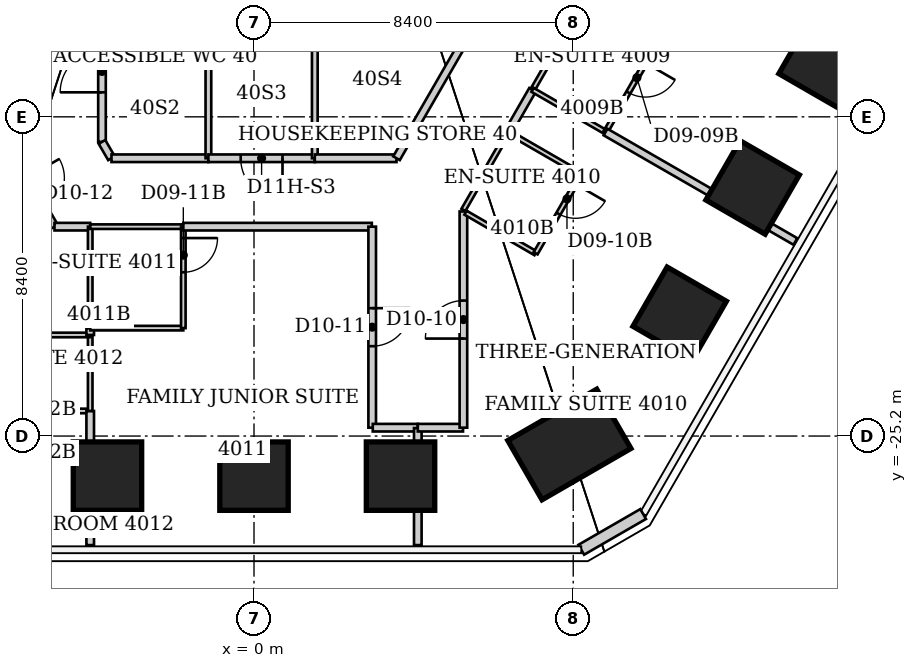
"""IFC4 building model, lengths in metres.
Left out: names, types, materials, properties, quantities, classifications, styles, units other than length and angle.
Written with IfcOpenShell. Run it as: python <this file> out.ifc"""

import sys

from ifc_helpers import new_model, si_unit, direction, frame, frame_2d, origin, origin_2d, place, context, subcontext, project, spatial, rectangle, extrude, element, fill, save


model = new_model("IFC4")
c1 = context("Model", 3, precision=1e-05, world=origin(), true_north=direction((0.0, 1.0)))
c2 = subcontext(c1, "Body", "Model", "MODEL_VIEW")
j1 = project(units=[si_unit("LENGTHUNIT", "METRE"), si_unit("PLANEANGLEUNIT", "RADIAN")], contexts=[c1])
p1 = place(None, origin())
s1 = spatial("IfcSite", under=j1, at=p1, CompositionType="ELEMENT")
p2 = place(p1, origin())
s2 = spatial("IfcBuilding", under=s1, at=p2, CompositionType="ELEMENT")
p3 = place(p2, frame((0.0, 0.0, 161.4)))
s3 = spatial("IfcBuildingStorey", under=s2, at=p3, CompositionType="ELEMENT", Elevation=161.4)
p4 = place(p3, frame((15.04, -15.333, 0.0), z_axis=(-0.034330688643, 0.034972383758, 0.99879844623), x_axis=(0.86556895094, -0.498559709879, 0.047208122752)))
e1 = element("IfcColumn", 1, at=p4, inside=s3, PredefinedType="COLUMN", context=c2, shape_type="SweptSolid", body=[
    extrude(rectangle(XDim=1.8, YDim=1.8, at=origin_2d()), origin(), (0.0, 0.0, 1.0), 3.805),
])
p5 = place(p3, frame((13.12, -18.658, 0.0), z_axis=(-0.029962490236, 0.042601913311, 0.998642742006), x_axis=(0.865617982926, -0.498471929182, 0.047236039769)))
e2 = element("IfcColumn", 2, at=p5, inside=s3, PredefinedType="COLUMN", context=c2, shape_type="SweptSolid", body=[
    extrude(rectangle(XDim=1.8, YDim=1.8, at=origin_2d()), origin(), (0.0, 0.0, 1.0), 3.805),
])
p6 = place(p3, frame((11.2, -21.983, 0.0), z_axis=(-0.025529655274, 0.050161282473, 0.998414784767), x_axis=(0.865565037486, -0.498569049576, 0.04718123236)))
e3 = element("IfcColumn", 3, at=p6, inside=s3, PredefinedType="COLUMN", context=c2, shape_type="SweptSolid", body=[
    extrude(rectangle(XDim=1.8, YDim=1.8, at=origin_2d()), origin(), (0.0, 0.0, 1.0), 3.806),
])
p7 = place(p3, frame((8.299, -25.422, 0.0), z_axis=(-0.019109248601, 0.058481995719, 0.998105551931), x_axis=(0.500012624267, -0.863923719226, 0.060192881077)))
e4 = element("IfcColumn", 4, at=p7, inside=s3, PredefinedType="COLUMN", context=c2, shape_type="SweptSolid", body=[
    extrude(rectangle(XDim=1.8, YDim=2.7, at=origin_2d()), origin(), (0.0, 0.0, 1.0), 3.807),
])
p8 = place(p3, frame((3.856, -26.255, 0.0), z_axis=(-0.008657869889, 0.059001779984, 0.998220332015), x_axis=(-0.000629006962, -0.998257870617, 0.058998543208)))
e5 = element("IfcColumn", 5, at=p8, inside=s3, PredefinedType="COLUMN", context=c2, shape_type="SweptSolid", body=[
    extrude(rectangle(XDim=1.8, YDim=1.8, at=origin_2d()), origin(), (0.0, 0.0, 1.0), 3.807),
])
p9 = place(p3, frame((0.0, -26.255, 0.0), z_axis=(0.0, 0.059003991457, 0.998257746773), x_axis=(0.0, -0.998257746773, 0.059003991457)))
e6 = element("IfcColumn", 6, at=p9, inside=s3, PredefinedType="COLUMN", context=c2, shape_type="SweptSolid", body=[
    extrude(rectangle(XDim=1.8, YDim=1.8, at=origin_2d()), origin(), (0.0, 0.0, 1.0), 3.807),
])
p10 = place(p3, frame((-3.856, -26.255, 0.0), z_axis=(0.008657869889, 0.059001779984, 0.998220332015), x_axis=(0.000629006962, -0.998257870617, 0.058998543208)))
e7 = element("IfcColumn", 7, at=p10, inside=s3, PredefinedType="COLUMN", context=c2, shape_type="SweptSolid", body=[
    extrude(rectangle(XDim=1.8, YDim=1.8, at=origin_2d()), origin(), (0.0, 0.0, 1.0), 3.807),
])
p11 = place(p3, frame((10.24, -27.252, 0.0), z_axis=(0.0, 0.0, 1.0), x_axis=(-0.866045024864, -0.499966013754, 0.0)))
e8 = element("IfcWall", 8, at=p11, inside=s3, PredefinedType="SOLIDWALL", context=c2, shape_type="SweptSolid", body=[
    extrude(rectangle(XDim=1.88, YDim=0.3, at=frame_2d((0.94, 0.0))), origin(), (0.0, 0.0, 1.0), 3.64),
])
p12 = place(p3, frame((-6.71, -24.54, 0.0), z_axis=(0.0, 0.0, 1.0), x_axis=(1.0, 0.0, 0.0)))
e9 = element("IfcWall", 9, at=p12, inside=s3, PredefinedType="PARTITIONING", context=c2, shape_type="SweptSolid", body=[
    extrude(rectangle(XDim=2.4, YDim=0.12, at=frame_2d((1.2, 0.0))), origin(), (0.0, 0.0, 1.0), 3.64),
])
p13 = place(p12, frame((0.45, 0.0, 0.0)))
e10 = element("IfcOpeningElement", 10, at=p13, cuts=e9, PredefinedType="OPENING", context=c2, shape_type="SweptSolid", body=[
    extrude(rectangle(XDim=0.9, YDim=2.03, at=frame_2d((0.45, 1.015))), frame((0.0, 0.06, 0.0), z_axis=(0.0, -1.0, 0.0), x_axis=(1.0, 0.0, 0.0)), (0.0, 0.0, 1.0), 0.12),
])
p14 = place(p3, frame((-6.23, -17.99, 0.0), z_axis=(0.0, 0.0, 1.0), x_axis=(0.499431599995, -0.866353321068, 0.0)))
e11 = element("IfcWall", 11, at=p14, inside=s3, PredefinedType="PARTITIONING", context=c2, shape_type="SweptSolid", body=[
    extrude(rectangle(XDim=1.962, YDim=0.2, at=frame_2d((0.981, 0.0))), origin(), (0.0, 0.0, 1.0), 3.64),
])
p15 = place(p14, frame((0.481, 0.0, 0.0)))
e12 = element("IfcOpeningElement", 12, at=p15, cuts=e11, PredefinedType="OPENING", context=c2, shape_type="SweptSolid", body=[
    extrude(rectangle(XDim=1.0, YDim=2.13, at=frame_2d((0.5, 1.065))), frame((0.0, 0.1, 0.0), z_axis=(0.0, -1.0, 0.0), x_axis=(1.0, 0.0, 0.0)), (0.0, 0.0, 1.0), 0.2),
])
p16 = place(p3, frame((-5.25, -19.69, 0.0), z_axis=(0.0, 0.0, 1.0), x_axis=(1.0, 0.0, 0.0)))
e13 = element("IfcWall", 13, at=p16, inside=s3, PredefinedType="PARTITIONING", context=c2, shape_type="SweptSolid", body=[
    extrude(rectangle(XDim=0.94, YDim=0.2, at=frame_2d((0.47, 0.0))), origin(), (0.0, 0.0, 1.0), 3.64),
])
p17 = place(p3, frame((-4.31, -28.07, 0.0), z_axis=(0.0, 0.0, 1.0), x_axis=(0.0, 1.0, 0.0)))
e14 = element("IfcWall", 14, at=p17, inside=s3, PredefinedType="PARTITIONING", context=c2, shape_type="SweptSolid", body=[
    extrude(rectangle(XDim=3.53, YDim=0.2, at=frame_2d((1.765, 0.0))), origin(), (0.0, 0.0, 1.0), 3.64),
])
p18 = place(p3, frame((-4.31, -24.54, 0.0), z_axis=(0.0, 0.0, 1.0), x_axis=(0.0, 1.0, 0.0)))
e15 = element("IfcWall", 15, at=p18, inside=s3, PredefinedType="PARTITIONING", context=c2, shape_type="SweptSolid", body=[
    extrude(rectangle(XDim=2.0, YDim=0.12, at=frame_2d((1.0, 0.0))), origin(), (0.0, 0.0, 1.0), 3.64),
])
p19 = place(p3, frame((-4.31, -22.54, 0.0), z_axis=(0.0, 0.0, 1.0), x_axis=(-1.0, 0.0, 0.0)))
e16 = element("IfcWall", 16, at=p19, inside=s3, PredefinedType="PARTITIONING", context=c2, shape_type="SweptSolid", body=[
    extrude(rectangle(XDim=2.4, YDim=0.12, at=frame_2d((1.2, 0.0))), origin(), (0.0, 0.0, 1.0), 3.64),
])
p20 = place(p3, frame((-4.31, -22.54, 0.0), z_axis=(0.0, 0.0, 1.0), x_axis=(0.0, 1.0, 0.0)))
e17 = element("IfcWall", 17, at=p20, inside=s3, PredefinedType="PARTITIONING", context=c2, shape_type="SweptSolid", body=[
    extrude(rectangle(XDim=0.18, YDim=0.2, at=frame_2d((0.09, 0.0))), origin(), (0.0, 0.0, 1.0), 3.64),
])
p21 = place(p3, frame((-4.31, -22.36, 0.0), z_axis=(0.0, 0.0, 1.0), x_axis=(0.0, 1.0, 0.0)))
e18 = element("IfcWall", 18, at=p21, inside=s3, PredefinedType="PARTITIONING", context=c2, shape_type="SweptSolid", body=[
    extrude(rectangle(XDim=2.67, YDim=0.12, at=frame_2d((1.335, 0.0))), origin(), (0.0, 0.0, 1.0), 3.64),
])
for number, where, z_axis, x_axis in (
    (19, (-4.31, -22.36, 0.0), (0.0, 0.0, 1.0), (1.0, 0.0, 0.0)),
    (20, (-4.31, -19.69, 0.0), (0.0, 0.0, 1.0), (1.0, 0.0, 0.0)),
):
    element("IfcWall", number, at=place(p3, frame(where, z_axis=z_axis, x_axis=x_axis)), inside=s3, PredefinedType="PARTITIONING", context=c2, shape_type="SweptSolid", body=[
        extrude(rectangle(XDim=2.45, YDim=0.12, at=frame_2d((1.225, 0.0))), origin(), (0.0, 0.0, 1.0), 3.64),
    ])
p22 = place(p3, frame((-4.0, -17.46, 0.0), z_axis=(0.0, 0.0, 1.0), x_axis=(0.0, 1.0, 0.0)))
e21 = element("IfcWall", 21, at=p22, inside=s3, PredefinedType="PARTITIONING", context=c2, shape_type="SweptSolid", body=[
    extrude(rectangle(XDim=3.71, YDim=0.2, at=frame_2d((1.855, 0.0))), origin(), (0.0, 0.0, 1.0), 3.64),
])
p23 = place(p22, frame((1.305, 0.0, 0.0)))
e22 = element("IfcOpeningElement", 22, at=p23, cuts=e21, PredefinedType="OPENING", context=c2, shape_type="SweptSolid", body=[
    extrude(rectangle(XDim=1.1, YDim=2.2, at=frame_2d((0.55, 1.1))), frame((0.0, 0.1, 0.0), z_axis=(0.0, -1.0, 0.0), x_axis=(1.0, 0.0, 0.0)), (0.0, 0.0, 1.0), 0.2),
])
p24 = place(p3, frame((-3.75, -17.89, 0.0), z_axis=(0.0, 0.0, 1.0), x_axis=(-0.502680181512, 0.864472460588, 0.0)))
e23 = element("IfcWall", 23, at=p24, inside=s3, PredefinedType="PARTITIONING", context=c2, shape_type="SweptSolid", body=[
    extrude(rectangle(XDim=0.497, YDim=0.2, at=frame_2d((0.249, 0.0))), origin(), (0.0, 0.0, 1.0), 3.64),
])
p25 = place(p3, frame((-1.86, -22.36, 0.0), z_axis=(0.0, 0.0, 1.0), x_axis=(0.0, 1.0, 0.0)))
e24 = element("IfcWall", 24, at=p25, inside=s3, PredefinedType="PARTITIONING", context=c2, shape_type="SweptSolid", body=[
    extrude(rectangle(XDim=2.67, YDim=0.12, at=frame_2d((1.335, 0.0))), origin(), (0.0, 0.0, 1.0), 2.86),
])
p26 = place(p25, frame((1.47, 0.0, 0.0)))
e25 = element("IfcOpeningElement", 25, at=p26, cuts=e24, PredefinedType="OPENING", context=c2, shape_type="SweptSolid", body=[
    extrude(rectangle(XDim=0.9, YDim=2.03, at=frame_2d((0.45, 1.015))), frame((0.0, 0.06, 0.0), z_axis=(0.0, -1.0, 0.0), x_axis=(1.0, 0.0, 0.0)), (0.0, 0.0, 1.0), 0.12),
])
p27 = place(p3, frame((-1.86, -19.69, 0.0), z_axis=(0.0, 0.0, 1.0), x_axis=(1.0, 0.0, 0.0)))
e26 = element("IfcWall", 26, at=p27, inside=s3, PredefinedType="PARTITIONING", context=c2, shape_type="SweptSolid", body=[
    extrude(rectangle(XDim=4.96, YDim=0.2, at=frame_2d((2.48, 0.0))), origin(), (0.0, 0.0, 1.0), 3.64),
])
p28 = place(p3, frame((-1.2, -17.89, 0.0), z_axis=(0.0, 0.0, 1.0), x_axis=(-1.0, 0.0, 0.0)))
e27 = element("IfcWall", 27, at=p28, inside=s3, PredefinedType="PARTITIONING", context=c2, shape_type="SweptSolid", body=[
    extrude(rectangle(XDim=2.55, YDim=0.2, at=frame_2d((1.275, 0.0))), origin(), (0.0, 0.0, 1.0), 3.64),
])
p29 = place(p3, frame((-1.2, -13.75, 0.0), z_axis=(0.0, 0.0, 1.0), x_axis=(0.0, -1.0, 0.0)))
e28 = element("IfcWall", 28, at=p29, inside=s3, PredefinedType="PARTITIONING", context=c2, shape_type="SweptSolid", body=[
    extrude(rectangle(XDim=4.14, YDim=0.15, at=frame_2d((2.07, 0.0))), origin(), (0.0, 0.0, 1.0), 3.64),
])
p30 = place(p3, frame((1.6, -17.89, 0.0), z_axis=(0.0, 0.0, 1.0), x_axis=(-1.0, 0.0, 0.0)))
e29 = element("IfcWall", 29, at=p30, inside=s3, PredefinedType="PARTITIONING", context=c2, shape_type="SweptSolid", body=[
    extrude(rectangle(XDim=2.8, YDim=0.2, at=frame_2d((1.4, 0.0))), origin(), (0.0, 0.0, 1.0), 3.64),
])
p31 = place(p30, frame((0.85, 0.0, 0.0)))
e30 = element("IfcOpeningElement", 30, at=p31, cuts=e29, PredefinedType="OPENING", context=c2, shape_type="SweptSolid", body=[
    extrude(rectangle(XDim=1.1, YDim=2.2, at=frame_2d((0.55, 1.1))), frame((0.0, 0.1, 0.0), z_axis=(0.0, -1.0, 0.0), x_axis=(1.0, 0.0, 0.0)), (0.0, 0.0, 1.0), 0.2),
])
p32 = place(p3, frame((1.6, -13.8, 0.0), z_axis=(0.0, 0.0, 1.0), x_axis=(0.0, -1.0, 0.0)))
e31 = element("IfcWall", 31, at=p32, inside=s3, PredefinedType="PARTITIONING", context=c2, shape_type="SweptSolid", body=[
    extrude(rectangle(XDim=4.09, YDim=0.15, at=frame_2d((2.045, 0.0))), origin(), (0.0, 0.0, 1.0), 3.64),
])
p33 = place(p3, frame((3.11, -19.69, 0.0), z_axis=(0.0, 0.0, 1.0), x_axis=(0.0, -1.0, 0.0)))
e32 = element("IfcWall", 32, at=p33, inside=s3, PredefinedType="PARTITIONING", context=c2, shape_type="SweptSolid", body=[
    extrude(rectangle(XDim=5.29, YDim=0.2, at=frame_2d((2.645, 0.0))), origin(), (0.0, 0.0, 1.0), 3.64),
])
p34 = place(p33, frame((2.145, 0.0, 0.0)))
e33 = element("IfcOpeningElement", 33, at=p34, cuts=e32, PredefinedType="OPENING", context=c2, shape_type="SweptSolid", body=[
    extrude(rectangle(XDim=1.0, YDim=2.13, at=frame_2d((0.5, 1.065))), frame((0.0, 0.1, 0.0), z_axis=(0.0, -1.0, 0.0), x_axis=(1.0, 0.0, 0.0)), (0.0, 0.0, 1.0), 0.2),
])
p35 = place(p3, frame((3.125, -24.98, 0.0), z_axis=(0.0, 0.0, 1.0), x_axis=(1.0, 0.0, 0.0)))
e34 = element("IfcWall", 34, at=p35, inside=s3, PredefinedType="PARTITIONING", context=c2, shape_type="SweptSolid", body=[
    extrude(rectangle(XDim=1.185, YDim=0.2, at=frame_2d((0.593, 0.0))), origin(), (0.0, 0.0, 1.0), 3.64),
])
p36 = place(p3, frame((3.75, -17.89, 0.0), z_axis=(0.0, 0.0, 1.0), x_axis=(-1.0, 0.0, 0.0)))
e35 = element("IfcWall", 35, at=p36, inside=s3, PredefinedType="PARTITIONING", context=c2, shape_type="SweptSolid", body=[
    extrude(rectangle(XDim=2.15, YDim=0.2, at=frame_2d((1.075, 0.0))), origin(), (0.0, 0.0, 1.0), 3.64),
])
p37 = place(p3, frame((4.31, -28.07, 0.0), z_axis=(0.0, 0.0, 1.0), x_axis=(0.0, 1.0, 0.0)))
e36 = element("IfcWall", 36, at=p37, inside=s3, PredefinedType="PARTITIONING", context=c2, shape_type="SweptSolid", body=[
    extrude(rectangle(XDim=3.08, YDim=0.2, at=frame_2d((1.54, 0.0))), origin(), (0.0, 0.0, 1.0), 3.64),
])
p38 = place(p3, frame((4.31, -24.98, 0.0), z_axis=(0.0, 0.0, 1.0), x_axis=(1.0, 0.0, 0.0)))
e37 = element("IfcWall", 37, at=p38, inside=s3, PredefinedType="PARTITIONING", context=c2, shape_type="SweptSolid", body=[
    extrude(rectangle(XDim=1.19, YDim=0.2, at=frame_2d((0.595, 0.0))), origin(), (0.0, 0.0, 1.0), 3.64),
])
p39 = place(p3, frame((5.51, -24.98, 0.0), z_axis=(0.0, 0.0, 1.0), x_axis=(0.0, 1.0, 0.0)))
e38 = element("IfcWall", 38, at=p39, inside=s3, PredefinedType="PARTITIONING", context=c2, shape_type="SweptSolid", body=[
    extrude(rectangle(XDim=5.69, YDim=0.2, at=frame_2d((2.845, 0.0))), origin(), (0.0, 0.0, 1.0), 3.64),
])
p40 = place(p39, frame((2.345, 0.0, 0.0)))
e39 = element("IfcOpeningElement", 39, at=p40, cuts=e38, PredefinedType="OPENING", context=c2, shape_type="SweptSolid", body=[
    extrude(rectangle(XDim=1.0, YDim=2.13, at=frame_2d((0.5, 1.065))), frame((0.0, 0.1, 0.0), z_axis=(0.0, -1.0, 0.0), x_axis=(1.0, 0.0, 0.0)), (0.0, 0.0, 1.0), 0.2),
])
p41 = place(p3, frame((5.51, -19.25, 0.0), z_axis=(0.0, 0.0, 1.0), x_axis=(0.498837591974, 0.866695481028, 0.0)))
e40 = element("IfcWall", 40, at=p41, inside=s3, PredefinedType="PARTITIONING", context=c2, shape_type="SweptSolid", body=[
    extrude(rectangle(XDim=2.365, YDim=0.12, at=frame_2d((1.183, 0.0))), origin(), (0.0, 0.0, 1.0), 3.64),
])
p42 = place(p3, frame((5.566, -19.323, 0.0), z_axis=(0.0, 0.0, 1.0), x_axis=(0.865436746432, -0.501018201192, 0.0)))
e41 = element("IfcWall", 41, at=p42, inside=s3, PredefinedType="PARTITIONING", context=c2, shape_type="SweptSolid", body=[
    extrude(rectangle(XDim=2.13, YDim=0.12, at=frame_2d((1.065, 0.0))), origin(), (0.0, 0.0, 1.0), 3.64),
])
p43 = place(p3, frame((6.083, -13.85, 0.0), z_axis=(0.0, 0.0, 1.0), x_axis=(-0.499977643516, -0.866038310922, 0.0)))
e42 = element("IfcWall", 42, at=p43, inside=s3, PredefinedType="PARTITIONING", context=c2, shape_type="SweptSolid", body=[
    extrude(rectangle(XDim=4.665, YDim=0.2, at=frame_2d((2.333, 0.0))), origin(), (0.0, 0.0, 1.0), 3.64),
])
p44 = place(p3, frame((6.69, -17.2, 0.0), z_axis=(0.0, 0.0, 1.0), x_axis=(0.499623473928, 0.866242682105, 0.0)))
e43 = element("IfcWall", 43, at=p44, inside=s3, PredefinedType="PARTITIONING", context=c2, shape_type="SweptSolid", body=[
    extrude(rectangle(XDim=1.281, YDim=0.2, at=frame_2d((0.641, 0.0))), origin(), (0.0, 0.0, 1.0), 3.64),
])
p45 = place(p3, frame((7.33, -16.09, 0.0), z_axis=(0.0, 0.0, 1.0), x_axis=(0.499693115345, 0.866202511239, 0.0)))
e44 = element("IfcWall", 44, at=p45, inside=s3, PredefinedType="PARTITIONING", context=c2, shape_type="SweptSolid", body=[
    extrude(rectangle(XDim=2.401, YDim=0.12, at=frame_2d((1.201, 0.0))), origin(), (0.0, 0.0, 1.0), 3.64),
])
p46 = place(p3, frame((7.33, -16.09, 0.0), z_axis=(0.0, 0.0, 1.0), x_axis=(0.86575271903, -0.500472006703, 0.0)))
e45 = element("IfcWall", 45, at=p46, inside=s3, PredefinedType="PARTITIONING", context=c2, shape_type="SweptSolid", body=[
    extrude(rectangle(XDim=2.218, YDim=0.12, at=frame_2d((1.109, 0.0))), origin(), (0.0, 0.0, 1.0), 3.64),
])
p47 = place(p3, frame((7.41, -20.39, 0.0), z_axis=(0.0, 0.0, 1.0), x_axis=(0.499737123639, 0.866177122335, 0.0)))
e46 = element("IfcWall", 46, at=p47, inside=s3, PredefinedType="PARTITIONING", context=c2, shape_type="SweptSolid", body=[
    extrude(rectangle(XDim=2.401, YDim=0.12, at=frame_2d((1.201, 0.0))), origin(), (0.0, 0.0, 1.0), 3.64),
])
p48 = place(p47, frame((1.201, 0.0, 0.0)))
e47 = element("IfcOpeningElement", 47, at=p48, cuts=e46, PredefinedType="OPENING", context=c2, shape_type="SweptSolid", body=[
    extrude(rectangle(XDim=0.9, YDim=2.03, at=frame_2d((0.45, 1.015))), frame((0.0, 0.06, 0.0), z_axis=(0.0, -1.0, 0.0), x_axis=(1.0, 0.0, 0.0)), (0.0, 0.0, 1.0), 0.12),
])
p49 = place(p3, frame((8.61, -18.31, 0.0), z_axis=(0.0, 0.0, 1.0), x_axis=(-0.865732595383, 0.500506816428, 0.0)))
e48 = element("IfcWall", 48, at=p49, inside=s3, PredefinedType="PARTITIONING", context=c2, shape_type="SweptSolid", body=[
    extrude(rectangle(XDim=2.218, YDim=0.12, at=frame_2d((1.109, 0.0))), origin(), (0.0, 0.0, 1.0), 3.64),
])
p50 = place(p3, frame((9.25, -17.2, 0.0), z_axis=(0.0, 0.0, 1.0), x_axis=(0.499737123639, 0.866177122335, 0.0)))
e49 = element("IfcWall", 49, at=p50, inside=s3, PredefinedType="PARTITIONING", context=c2, shape_type="SweptSolid", body=[
    extrude(rectangle(XDim=2.401, YDim=0.12, at=frame_2d((1.201, 0.0))), origin(), (0.0, 0.0, 1.0), 3.64),
])
p51 = place(p50, frame((1.201, 0.0, 0.0)))
e50 = element("IfcOpeningElement", 50, at=p51, cuts=e49, PredefinedType="OPENING", context=c2, shape_type="SweptSolid", body=[
    extrude(rectangle(XDim=0.9, YDim=2.03, at=frame_2d((0.45, 1.015))), frame((0.0, 0.06, 0.0), z_axis=(0.0, -1.0, 0.0), x_axis=(1.0, 0.0, 0.0)), (0.0, 0.0, 1.0), 0.12),
])
p52 = place(p3, frame((9.25, -17.2, 0.0), z_axis=(0.0, 0.0, 1.0), x_axis=(0.866353281607, -0.499431668448, 0.0)))
e51 = element("IfcWall", 51, at=p52, inside=s3, PredefinedType="PARTITIONING", context=c2, shape_type="SweptSolid", body=[
    extrude(rectangle(XDim=5.767, YDim=0.2, at=frame_2d((2.883, 0.0))), origin(), (0.0, 0.0, 1.0), 3.64),
])
p53 = place(p3, frame((10.45, -15.12, 0.0), z_axis=(0.0, 0.0, 1.0), x_axis=(-0.865705017107, 0.500554515868, 0.0)))
e52 = element("IfcWall", 52, at=p53, inside=s3, PredefinedType="PARTITIONING", context=c2, shape_type="SweptSolid", body=[
    extrude(rectangle(XDim=2.218, YDim=0.12, at=frame_2d((1.109, 0.0))), origin(), (0.0, 0.0, 1.0), 3.64),
])
p54 = place(p51, origin())
e53 = element("IfcDoor", 53, at=p54, inside=s3, OperationType="SINGLE_SWING_RIGHT", PredefinedType="DOOR", context=c2, shape_type="SweptSolid", body=[
    extrude(rectangle(XDim=0.9, YDim=2.03, at=frame_2d((0.45, 1.015))), frame((0.0, 0.025, 0.0), z_axis=(0.0, -1.0, 0.0), x_axis=(1.0, 0.0, 0.0)), (0.0, 0.0, 1.0), 0.05),
])
fill(e50, e53)
p55 = place(p40, origin())
e54 = element("IfcDoor", 54, at=p55, inside=s3, OperationType="SINGLE_SWING_LEFT", PredefinedType="DOOR", context=c2, shape_type="SweptSolid", body=[
    extrude(rectangle(XDim=1.0, YDim=2.13, at=frame_2d((0.5, 1.065))), frame((0.0, 0.025, 0.0), z_axis=(0.0, -1.0, 0.0), x_axis=(1.0, 0.0, 0.0)), (0.0, 0.0, 1.0), 0.05),
])
fill(e39, e54)
p56 = place(p48, origin())
e55 = element("IfcDoor", 55, at=p56, inside=s3, OperationType="SINGLE_SWING_RIGHT", PredefinedType="DOOR", context=c2, shape_type="SweptSolid", body=[
    extrude(rectangle(XDim=0.9, YDim=2.03, at=frame_2d((0.45, 1.015))), frame((0.0, 0.025, 0.0), z_axis=(0.0, -1.0, 0.0), x_axis=(1.0, 0.0, 0.0)), (0.0, 0.0, 1.0), 0.05),
])
fill(e47, e55)
p57 = place(p34, origin())
e56 = element("IfcDoor", 56, at=p57, inside=s3, OperationType="SINGLE_SWING_LEFT", PredefinedType="DOOR", context=c2, shape_type="SweptSolid", body=[
    extrude(rectangle(XDim=1.0, YDim=2.13, at=frame_2d((0.5, 1.065))), frame((0.0, 0.025, 0.0), z_axis=(0.0, -1.0, 0.0), x_axis=(1.0, 0.0, 0.0)), (0.0, 0.0, 1.0), 0.05),
])
fill(e33, e56)
p58 = place(p26, origin())
e57 = element("IfcDoor", 57, at=p58, inside=s3, OperationType="SINGLE_SWING_RIGHT", PredefinedType="DOOR", context=c2, shape_type="SweptSolid", body=[
    extrude(rectangle(XDim=0.9, YDim=2.03, at=frame_2d((0.45, 1.015))), frame((0.0, 0.025, 0.0), z_axis=(0.0, -1.0, 0.0), x_axis=(1.0, 0.0, 0.0)), (0.0, 0.0, 1.0), 0.05),
])
fill(e25, e57)
p59 = place(p23, origin())
e58 = element("IfcDoor", 58, at=p59, inside=s3, OperationType="SINGLE_SWING_LEFT", PredefinedType="DOOR", context=c2, shape_type="SweptSolid", body=[
    extrude(rectangle(XDim=1.1, YDim=2.2, at=frame_2d((0.55, 1.1))), frame((0.0, 0.025, 0.0), z_axis=(0.0, -1.0, 0.0), x_axis=(1.0, 0.0, 0.0)), (0.0, 0.0, 1.0), 0.05),
])
fill(e22, e58)
p60 = place(p31, origin())
e59 = element("IfcDoor", 59, at=p60, inside=s3, OperationType="SINGLE_SWING_LEFT", PredefinedType="DOOR", context=c2, shape_type="SweptSolid", body=[
    extrude(rectangle(XDim=1.1, YDim=2.2, at=frame_2d((0.55, 1.1))), frame((0.0, 0.025, 0.0), z_axis=(0.0, -1.0, 0.0), x_axis=(1.0, 0.0, 0.0)), (0.0, 0.0, 1.0), 0.05),
])
fill(e30, e59)
save(model, sys.argv[1])
